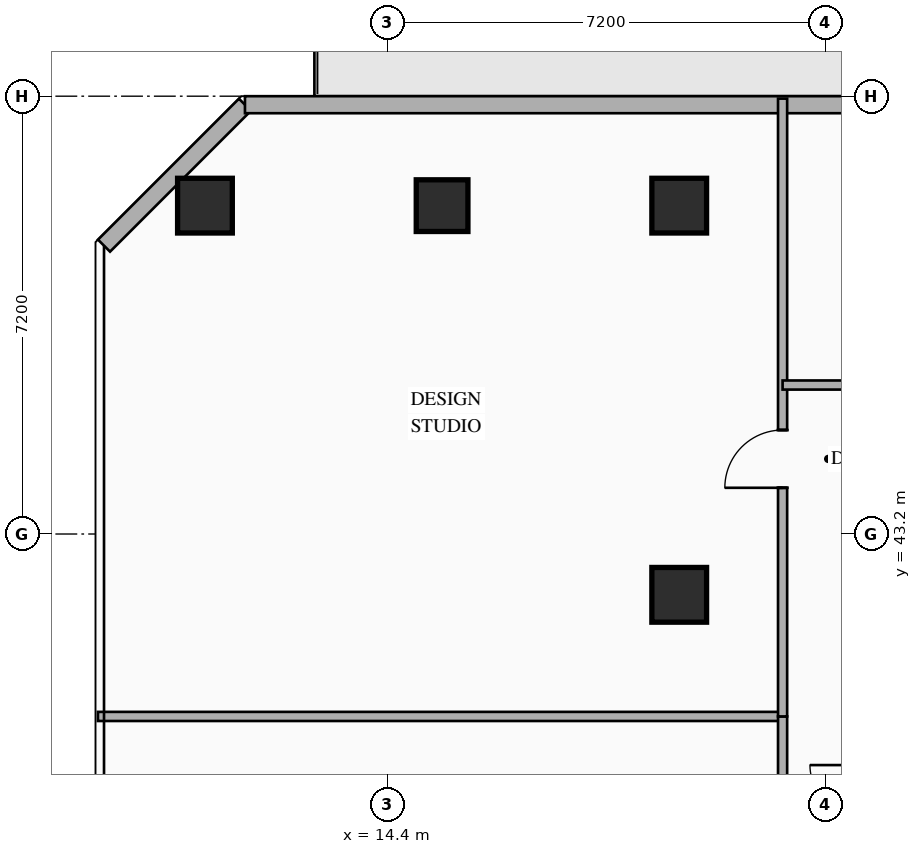
"""IFC4 building model, lengths in metres.
Left out: names, types, materials, properties, quantities, classifications, styles, units other than length and angle.
Written with IfcOpenShell. Run it as: python <this file> out.ifc"""

import sys

from ifc_helpers import new_model, si_unit, direction, frame, frame_2d, origin, origin_2d, place, context, subcontext, project, spatial, rectangle, hollow_rectangle, extrude, element, fill, save


model = new_model("IFC4")
c1 = context("Model", 3, precision=1e-05, world=origin(), true_north=direction((0.0, 1.0)))
c2 = subcontext(c1, "Body", "Model", "MODEL_VIEW")
j1 = project(units=[si_unit("LENGTHUNIT", "METRE"), si_unit("PLANEANGLEUNIT", "RADIAN")], contexts=[c1])
p1 = place(None, origin())
s1 = spatial("IfcSite", under=j1, at=p1, CompositionType="ELEMENT")
p2 = place(p1, origin())
s2 = spatial("IfcBuilding", under=s1, at=p2, CompositionType="ELEMENT")
p3 = place(p2, frame((0.0, 0.0, 101.25)))
s3 = spatial("IfcBuildingStorey", under=s2, at=p3, CompositionType="ELEMENT", Elevation=101.25)
for number, where, z_axis, x_axis in (
    (1, (11.4, 48.6, 0.0), (0.0, 0.0, 1.0), (1.0, 0.0, 0.0)),
    (2, (19.2, 48.6, 0.0), (0.0, 0.0, 1.0), (1.0, 0.0, 0.0)),
    (3, (19.2, 42.2, 0.0), (0.0, 0.0, 1.0), (1.0, 0.0, 0.0)),
):
    element("IfcColumn", number, at=place(p3, frame(where, z_axis=z_axis, x_axis=x_axis)), inside=s3, PredefinedType="COLUMN", context=c2, shape_type="SweptSolid", body=[
        extrude(hollow_rectangle(XDim=0.9, YDim=0.9, WallThickness=0.036, at=origin_2d()), origin(), (0.0, 0.0, 1.0), 3.6),
    ])
p4 = place(p3, frame((15.3, 48.6, 0.0), z_axis=(0.0, 0.0, 1.0), x_axis=(1.0, 0.0, 0.0)))
e4 = element("IfcColumn", 4, at=p4, inside=s3, PredefinedType="COLUMN", context=c2, shape_type="SweptSolid", body=[
    extrude(hollow_rectangle(XDim=0.85, YDim=0.85, WallThickness=0.032, at=origin_2d()), origin(), (0.0, 0.0, 1.0), 3.6),
])
p5 = place(p3, frame((9.74, 47.942, 0.0), z_axis=(0.0, 0.0, 1.0), x_axis=(0.707106781187, 0.707106781187, 0.0)))
e5 = element("IfcWall", 5, at=p5, inside=s3, PredefinedType="STANDARD", context=c2, shape_type="SweptSolid", body=[
    extrude(rectangle(XDim=3.278, YDim=0.28, at=frame_2d((1.639, 0.0))), origin(), (0.0, 0.0, 1.0), 3.35),
])
p6 = place(p3, frame((12.058, 50.26, 0.0), z_axis=(0.0, 0.0, 1.0), x_axis=(1.0, 0.0, 0.0)))
e6 = element("IfcWall", 6, at=p6, inside=s3, PredefinedType="STANDARD", context=c2, shape_type="SweptSolid", body=[
    extrude(rectangle(XDim=30.484, YDim=0.28, at=frame_2d((15.242, 0.0))), origin(), (0.0, 0.0, 1.0), 3.35),
])
p7 = place(p6, frame((10.424, 0.0, 0.0)))
e7 = element("IfcOpeningElement", 7, at=p7, cuts=e6, PredefinedType="OPENING", context=c2, shape_type="SweptSolid", body=[
    extrude(rectangle(XDim=1.1, YDim=2.2, at=frame_2d((0.55, 1.1))), frame((0.0, 0.15, 0.0), z_axis=(0.0, -1.0, 0.0), x_axis=(1.0, 0.0, 0.0)), (0.0, 0.0, 1.0), 0.3),
])
p8 = place(p3, frame((9.64, 40.2, 0.0), z_axis=(0.0, 0.0, 1.0), x_axis=(1.0, 0.0, 0.0)))
e8 = element("IfcWall", 8, at=p8, inside=s3, PredefinedType="PARTITIONING", context=c2, shape_type="SweptSolid", body=[
    extrude(rectangle(XDim=11.26, YDim=0.15, at=frame_2d((5.63, 0.0))), origin(), (0.0, 0.0, 1.0), 3.35),
])
p9 = place(p3, frame((20.9, 30.6, 0.0), z_axis=(0.0, 0.0, 1.0), x_axis=(0.0, 1.0, 0.0)))
e9 = element("IfcWall", 9, at=p9, inside=s3, PredefinedType="PARTITIONING", context=c2, shape_type="SweptSolid", body=[
    extrude(rectangle(XDim=9.6, YDim=0.15, at=frame_2d((4.8, 0.0))), origin(), (0.0, 0.0, 1.0), 3.35),
])
p10 = place(p9, frame((1.169, 0.0, 0.0)))
e10 = element("IfcOpeningElement", 10, at=p10, cuts=e9, PredefinedType="OPENING", context=c2, shape_type="SweptSolid", body=[
    extrude(rectangle(XDim=0.95, YDim=2.15, at=frame_2d((0.475, 1.075))), frame((0.0, 0.085, 0.0), z_axis=(0.0, -1.0, 0.0), x_axis=(1.0, 0.0, 0.0)), (0.0, 0.0, 1.0), 0.17),
])
p11 = place(p3, frame((20.9, 40.2, 0.0), z_axis=(0.0, 0.0, 1.0), x_axis=(0.0, 1.0, 0.0)))
e11 = element("IfcWall", 11, at=p11, inside=s3, PredefinedType="PARTITIONING", context=c2, shape_type="SweptSolid", body=[
    extrude(rectangle(XDim=10.16, YDim=0.15, at=frame_2d((5.08, 0.0))), origin(), (0.0, 0.0, 1.0), 3.35),
])
p12 = place(p11, frame((3.76, 0.0, 0.0)))
e12 = element("IfcOpeningElement", 12, at=p12, cuts=e11, PredefinedType="OPENING", context=c2, shape_type="SweptSolid", body=[
    extrude(rectangle(XDim=0.95, YDim=2.15, at=frame_2d((0.475, 1.075))), frame((0.0, 0.085, 0.0), z_axis=(0.0, -1.0, 0.0), x_axis=(1.0, 0.0, 0.0)), (0.0, 0.0, 1.0), 0.17),
])
p13 = place(p3, frame((20.9, 45.65, 0.0), z_axis=(0.0, 0.0, 1.0), x_axis=(1.0, 0.0, 0.0)))
e13 = element("IfcWall", 13, at=p13, inside=s3, PredefinedType="PARTITIONING", context=c2, shape_type="SweptSolid", body=[
    extrude(rectangle(XDim=8.1, YDim=0.15, at=frame_2d((4.05, 0.0))), origin(), (0.0, 0.0, 1.0), 2.695),
])
p14 = place(p13, frame((1.658, 0.0, 0.0)))
e14 = element("IfcOpeningElement", 14, at=p14, cuts=e13, PredefinedType="OPENING", context=c2, shape_type="SweptSolid", body=[
    extrude(rectangle(XDim=0.95, YDim=2.15, at=frame_2d((0.475, 1.075))), frame((0.0, 0.085, 0.0), z_axis=(0.0, -1.0, 0.0), x_axis=(1.0, 0.0, 0.0)), (0.0, 0.0, 1.0), 0.17),
])
p15 = place(p12, origin())
e15 = element("IfcDoor", 15, at=p15, inside=s3, OperationType="SINGLE_SWING_LEFT", PredefinedType="DOOR", context=c2, shape_type="SweptSolid", body=[
    extrude(rectangle(XDim=0.95, YDim=2.15, at=frame_2d((0.475, 1.075))), frame((0.0, 0.025, 0.0), z_axis=(0.0, -1.0, 0.0), x_axis=(1.0, 0.0, 0.0)), (0.0, 0.0, 1.0), 0.05),
])
fill(e12, e15)
save(model, sys.argv[1])
